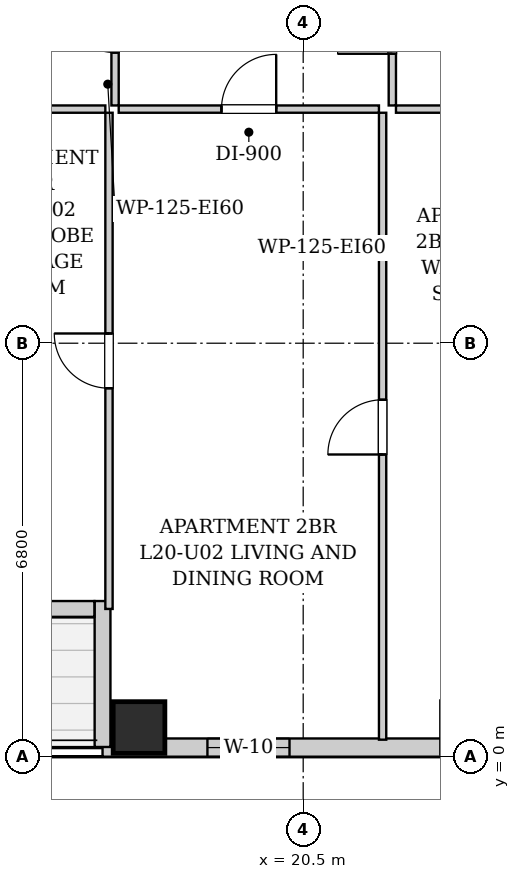
"""IFC4 building model, lengths in metres.
Left out: names, types, materials, properties, quantities, classifications, styles, units other than length and angle.
Written with IfcOpenShell. Run it as: python <this file> out.ifc"""

import sys

from ifc_helpers import new_model, si_unit, direction, frame, frame_2d, origin, origin_2d, place, context, subcontext, project, spatial, rectangle, extrude, element, fill, save


model = new_model("IFC4")
c1 = context("Model", 3, precision=1e-05, world=origin(), true_north=direction((0.0, 1.0)))
c2 = subcontext(c1, "Body", "Model", "MODEL_VIEW")
j1 = project(units=[si_unit("LENGTHUNIT", "METRE"), si_unit("PLANEANGLEUNIT", "RADIAN")], contexts=[c1])
p1 = place(None, origin())
s1 = spatial("IfcSite", under=j1, at=p1, CompositionType="ELEMENT")
p2 = place(p1, origin())
s2 = spatial("IfcBuilding", under=s1, at=p2, CompositionType="ELEMENT")
p3 = place(p2, frame((0.0, 0.0, 75.1)))
s3 = spatial("IfcBuildingStorey", under=s2, at=p3, CompositionType="ELEMENT", Elevation=75.1)
p4 = place(p3, frame((17.8, 0.48, 0.0), z_axis=(0.0, 0.0, 1.0), x_axis=(1.0, 0.0, 0.0)))
e1 = element("IfcColumn", 1, at=p4, inside=s3, PredefinedType="COLUMN", context=c2, shape_type="SweptSolid", body=[
    extrude(rectangle(XDim=0.85, YDim=0.85, at=origin_2d()), origin(), (0.0, 0.0, 1.0), 3.2),
])
p5 = place(p3, frame((40.9, 0.15, 0.0), z_axis=(0.0, 0.0, 1.0), x_axis=(-1.0, 0.0, 0.0)))
e2 = element("IfcWall", 2, at=p5, inside=s3, PredefinedType="SOLIDWALL", context=c2, shape_type="SweptSolid", body=[
    extrude(rectangle(XDim=23.7, YDim=0.3, at=frame_2d((11.85, 0.0))), origin(), (0.0, 0.0, 1.0), 2.94),
])
p6 = place(p5, frame((20.625, 0.0, 0.55)))
e3 = element("IfcOpeningElement", 3, at=p6, cuts=e2, PredefinedType="OPENING", context=c2, shape_type="SweptSolid", body=[
    extrude(rectangle(XDim=1.35, YDim=1.2, at=frame_2d((0.675, 0.6))), frame((0.0, 0.16, 0.0), z_axis=(0.0, -1.0, 0.0), x_axis=(1.0, 0.0, 0.0)), (0.0, 0.0, 1.0), 0.32),
])
p7 = place(p5, frame((12.55, 0.0, 0.55)))
e4 = element("IfcOpeningElement", 4, at=p7, cuts=e2, PredefinedType="OPENING", context=c2, shape_type="SweptSolid", body=[
    extrude(rectangle(XDim=0.85, YDim=1.2, at=frame_2d((0.425, 0.6))), frame((0.0, 0.16, 0.0), z_axis=(0.0, -1.0, 0.0), x_axis=(1.0, 0.0, 0.0)), (0.0, 0.0, 1.0), 0.32),
])
p8 = place(p5, frame((9.6, 0.0, 0.55)))
e5 = element("IfcOpeningElement", 5, at=p8, cuts=e2, PredefinedType="OPENING", context=c2, shape_type="SweptSolid", body=[
    extrude(rectangle(XDim=1.35, YDim=1.2, at=frame_2d((0.675, 0.6))), frame((0.0, 0.16, 0.0), z_axis=(0.0, -1.0, 0.0), x_axis=(1.0, 0.0, 0.0)), (0.0, 0.0, 1.0), 0.32),
])
p9 = place(p5, frame((5.765, 0.0, 0.55)))
e6 = element("IfcOpeningElement", 6, at=p9, cuts=e2, PredefinedType="OPENING", context=c2, shape_type="SweptSolid", body=[
    extrude(rectangle(XDim=1.35, YDim=1.2, at=frame_2d((0.675, 0.6))), frame((0.0, 0.16, 0.0), z_axis=(0.0, -1.0, 0.0), x_axis=(1.0, 0.0, 0.0)), (0.0, 0.0, 1.0), 0.32),
])
p10 = place(p5, frame((2.1, 0.0, 0.55)))
e7 = element("IfcOpeningElement", 7, at=p10, cuts=e2, PredefinedType="OPENING", context=c2, shape_type="SweptSolid", body=[
    extrude(rectangle(XDim=1.35, YDim=1.2, at=frame_2d((0.675, 0.6))), frame((0.0, 0.16, 0.0), z_axis=(0.0, -1.0, 0.0), x_axis=(1.0, 0.0, 0.0)), (0.0, 0.0, 1.0), 0.32),
])
p11 = place(p3, frame((17.2, 0.16, 0.0), z_axis=(0.0, 0.0, 1.0), x_axis=(0.0, 1.0, 0.0)))
e8 = element("IfcWall", 8, at=p11, inside=s3, PredefinedType="SOLIDWALL", context=c2, shape_type="SweptSolid", body=[
    extrude(rectangle(XDim=2.4, YDim=0.26, at=frame_2d((1.2, 0.0))), origin(), (0.0, 0.0, 1.0), 2.94),
])
p12 = place(p3, frame((17.066, 2.43, 0.0), z_axis=(0.0, 0.0, 1.0), x_axis=(-1.0, 0.0, 0.0)))
e9 = element("IfcWall", 9, at=p12, inside=s3, PredefinedType="SOLIDWALL", context=c2, shape_type="SweptSolid", body=[
    extrude(rectangle(XDim=4.332, YDim=0.26, at=frame_2d((2.166, 0.0))), origin(), (0.0, 0.0, 1.0), 2.94),
])
p13 = place(p12, frame((0.92, 0.0, 0.0)))
e10 = element("IfcOpeningElement", 10, at=p13, cuts=e9, PredefinedType="OPENING", context=c2, shape_type="SweptSolid", body=[
    extrude(rectangle(XDim=1.1, YDim=2.0, at=frame_2d((0.55, 1.0))), frame((0.0, 0.14, 0.0), z_axis=(0.0, -1.0, 0.0), x_axis=(1.0, 0.0, 0.0)), (0.0, 0.0, 1.0), 0.28),
])
p14 = place(p3, frame((17.406, 10.71, 0.0), z_axis=(0.0, 0.0, 1.0), x_axis=(0.0, 1.0, 0.0)))
e11 = element("IfcWall", 11, at=p14, inside=s3, PredefinedType="PARTITIONING", context=c2, shape_type="SweptSolid", body=[
    extrude(rectangle(XDim=2.6, YDim=0.12, at=frame_2d((1.3, 0.0))), origin(), (0.0, 0.0, 1.0), 2.94),
])
p15 = place(p14, frame((0.87, 0.0, 0.0)))
e12 = element("IfcOpeningElement", 12, at=p15, cuts=e11, PredefinedType="OPENING", context=c2, shape_type="SweptSolid", body=[
    extrude(rectangle(XDim=0.86, YDim=2.05, at=frame_2d((0.43, 1.025))), frame((0.0, 0.07, 0.0), z_axis=(0.0, -1.0, 0.0), x_axis=(1.0, 0.0, 0.0)), (0.0, 0.0, 1.0), 0.14),
])
p16 = place(p3, frame((14.946, 10.65, 0.0), z_axis=(0.0, 0.0, 1.0), x_axis=(1.0, 0.0, 0.0)))
e13 = element("IfcWall", 13, at=p16, inside=s3, PredefinedType="PARTITIONING", context=c2, shape_type="SweptSolid", body=[
    extrude(rectangle(XDim=2.3, YDim=0.12, at=frame_2d((1.15, 0.0))), origin(), (0.0, 0.0, 1.0), 2.94),
])
p17 = place(p3, frame((21.966, 10.71, 0.0), z_axis=(0.0, 0.0, 1.0), x_axis=(0.0, 1.0, 0.0)))
e14 = element("IfcWall", 14, at=p17, inside=s3, PredefinedType="PARTITIONING", context=c2, shape_type="SweptSolid", body=[
    extrude(rectangle(XDim=2.6, YDim=0.12, at=frame_2d((1.3, 0.0))), origin(), (0.0, 0.0, 1.0), 2.94),
])
p18 = place(p17, frame((0.85, 0.0, 0.0)))
e15 = element("IfcOpeningElement", 15, at=p18, cuts=e14, PredefinedType="OPENING", context=c2, shape_type="SweptSolid", body=[
    extrude(rectangle(XDim=0.9, YDim=2.05, at=frame_2d((0.45, 1.025))), frame((0.0, 0.07, 0.0), z_axis=(0.0, -1.0, 0.0), x_axis=(1.0, 0.0, 0.0)), (0.0, 0.0, 1.0), 0.14),
])
p19 = place(p3, frame((17.466, 10.65, 0.0), z_axis=(0.0, 0.0, 1.0), x_axis=(1.0, 0.0, 0.0)))
e16 = element("IfcWall", 16, at=p19, inside=s3, PredefinedType="PARTITIONING", context=c2, shape_type="SweptSolid", body=[
    extrude(rectangle(XDim=4.28, YDim=0.12, at=frame_2d((2.14, 0.0))), origin(), (0.0, 0.0, 1.0), 2.94),
])
p20 = place(p19, frame((1.69, 0.0, 0.0)))
e17 = element("IfcOpeningElement", 17, at=p20, cuts=e16, PredefinedType="OPENING", context=c2, shape_type="SweptSolid", body=[
    extrude(rectangle(XDim=0.9, YDim=2.05, at=frame_2d((0.45, 1.025))), frame((0.0, 0.07, 0.0), z_axis=(0.0, -1.0, 0.0), x_axis=(1.0, 0.0, 0.0)), (0.0, 0.0, 1.0), 0.14),
])
p21 = place(p3, frame((22.026, 10.65, 0.0), z_axis=(0.0, 0.0, 1.0), x_axis=(1.0, 0.0, 0.0)))
e18 = element("IfcWall", 18, at=p21, inside=s3, PredefinedType="PARTITIONING", context=c2, shape_type="SweptSolid", body=[
    extrude(rectangle(XDim=2.905, YDim=0.12, at=frame_2d((1.453, 0.0))), origin(), (0.0, 0.0, 1.0), 2.94),
])
p22 = place(p21, frame((1.003, 0.0, 0.0)))
e19 = element("IfcOpeningElement", 19, at=p22, cuts=e18, PredefinedType="OPENING", context=c2, shape_type="SweptSolid", body=[
    extrude(rectangle(XDim=0.9, YDim=2.05, at=frame_2d((0.45, 1.025))), frame((0.0, 0.07, 0.0), z_axis=(0.0, -1.0, 0.0), x_axis=(1.0, 0.0, 0.0)), (0.0, 0.0, 1.0), 0.14),
])
p23 = place(p3, frame((17.306, 2.43, 0.0), z_axis=(0.0, 0.0, 1.0), x_axis=(0.0, 1.0, 0.0)))
e20 = element("IfcWall", 20, at=p23, inside=s3, PredefinedType="PARTITIONING", context=c2, shape_type="SweptSolid", body=[
    extrude(rectangle(XDim=8.16, YDim=0.12, at=frame_2d((4.08, 0.0))), origin(), (0.0, 0.0, 1.0), 2.94),
])
p24 = place(p23, frame((3.63, 0.0, 0.0)))
e21 = element("IfcOpeningElement", 21, at=p24, cuts=e20, PredefinedType="OPENING", context=c2, shape_type="SweptSolid", body=[
    extrude(rectangle(XDim=0.9, YDim=2.05, at=frame_2d((0.45, 1.025))), frame((0.0, 0.07, 0.0), z_axis=(0.0, -1.0, 0.0), x_axis=(1.0, 0.0, 0.0)), (0.0, 0.0, 1.0), 0.14),
])
p25 = place(p3, frame((21.806, 0.28, 0.0), z_axis=(0.0, 0.0, 1.0), x_axis=(0.0, 1.0, 0.0)))
e22 = element("IfcWall", 22, at=p25, inside=s3, PredefinedType="PARTITIONING", context=c2, shape_type="SweptSolid", body=[
    extrude(rectangle(XDim=10.31, YDim=0.12, at=frame_2d((5.155, 0.0))), origin(), (0.0, 0.0, 1.0), 2.94),
])
p26 = place(p25, frame((4.69, 0.0, 0.0)))
e23 = element("IfcOpeningElement", 23, at=p26, cuts=e22, PredefinedType="OPENING", context=c2, shape_type="SweptSolid", body=[
    extrude(rectangle(XDim=0.9, YDim=2.05, at=frame_2d((0.45, 1.025))), frame((0.0, 0.07, 0.0), z_axis=(0.0, -1.0, 0.0), x_axis=(1.0, 0.0, 0.0)), (0.0, 0.0, 1.0), 0.14),
])
p27 = place(p15, origin())
e24 = element("IfcDoor", 24, at=p27, inside=s3, OperationType="SINGLE_SWING_RIGHT", PredefinedType="DOOR", context=c2, shape_type="SweptSolid", body=[
    extrude(rectangle(XDim=0.86, YDim=2.05, at=frame_2d((0.43, 1.025))), frame((0.0, 0.025, 0.0), z_axis=(0.0, -1.0, 0.0), x_axis=(1.0, 0.0, 0.0)), (0.0, 0.0, 1.0), 0.05),
])
fill(e12, e24)
p28 = place(p18, origin())
e25 = element("IfcDoor", 25, at=p28, inside=s3, OperationType="SINGLE_SWING_LEFT", PredefinedType="DOOR", context=c2, shape_type="SweptSolid", body=[
    extrude(rectangle(XDim=0.9, YDim=2.05, at=frame_2d((0.45, 1.025))), frame((0.0, 0.025, 0.0), z_axis=(0.0, -1.0, 0.0), x_axis=(1.0, 0.0, 0.0)), (0.0, 0.0, 1.0), 0.05),
])
fill(e15, e25)
p29 = place(p20, origin())
e26 = element("IfcDoor", 26, at=p29, inside=s3, OperationType="SINGLE_SWING_RIGHT", PredefinedType="DOOR", context=c2, shape_type="SweptSolid", body=[
    extrude(rectangle(XDim=0.9, YDim=2.05, at=frame_2d((0.45, 1.025))), frame((0.0, 0.025, 0.0), z_axis=(0.0, -1.0, 0.0), x_axis=(1.0, 0.0, 0.0)), (0.0, 0.0, 1.0), 0.05),
])
fill(e17, e26)
p30 = place(p24, origin())
e27 = element("IfcDoor", 27, at=p30, inside=s3, OperationType="SINGLE_SWING_RIGHT", PredefinedType="DOOR", context=c2, shape_type="SweptSolid", body=[
    extrude(rectangle(XDim=0.9, YDim=2.05, at=frame_2d((0.45, 1.025))), frame((0.0, 0.025, 0.0), z_axis=(0.0, -1.0, 0.0), x_axis=(1.0, 0.0, 0.0)), (0.0, 0.0, 1.0), 0.05),
])
fill(e21, e27)
p31 = place(p26, origin())
e28 = element("IfcDoor", 28, at=p31, inside=s3, OperationType="SINGLE_SWING_LEFT", PredefinedType="DOOR", context=c2, shape_type="SweptSolid", body=[
    extrude(rectangle(XDim=0.9, YDim=2.05, at=frame_2d((0.45, 1.025))), frame((0.0, 0.025, 0.0), z_axis=(0.0, -1.0, 0.0), x_axis=(1.0, 0.0, 0.0)), (0.0, 0.0, 1.0), 0.05),
])
fill(e23, e28)
p32 = place(p6, origin())
e29 = element("IfcWindow", 29, at=p32, inside=s3, PartitioningType="SINGLE_PANEL", PredefinedType="WINDOW", context=c2, shape_type="SweptSolid", body=[
    extrude(rectangle(XDim=1.35, YDim=1.2, at=frame_2d((0.675, 0.6))), frame((0.0, 0.03, 0.0), z_axis=(0.0, -1.0, 0.0), x_axis=(1.0, 0.0, 0.0)), (0.0, 0.0, 1.0), 0.06),
])
fill(e3, e29)
save(model, sys.argv[1])
